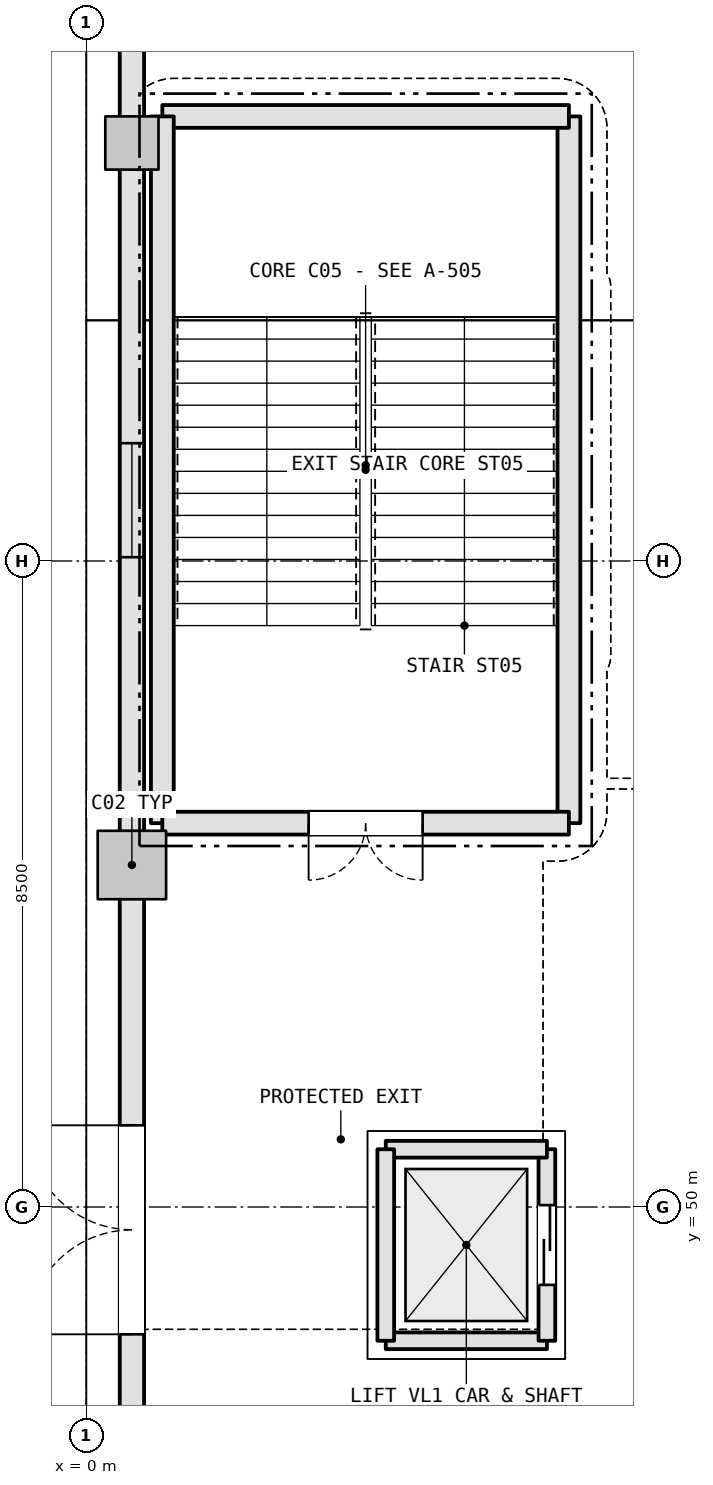
"""IFC4 building model, lengths in metres.
Left out: names, types, materials, properties, quantities, classifications, styles, units other than length and angle.
Written with IfcOpenShell. Run it as: python <this file> out.ifc"""

import sys

from ifc_helpers import new_model, si_unit, direction, frame, frame_2d, origin, origin_2d, place, context, subcontext, project, spatial, rectangle, extrude, element, fill, save


model = new_model("IFC4")
c1 = context("Model", 3, precision=1e-05, world=origin(), true_north=direction((0.0, 1.0)))
c2 = subcontext(c1, "Body", "Model", "MODEL_VIEW")
j1 = project(units=[si_unit("LENGTHUNIT", "METRE"), si_unit("PLANEANGLEUNIT", "RADIAN")], contexts=[c1])
p1 = place(None, origin())
s1 = spatial("IfcSite", under=j1, at=p1, CompositionType="ELEMENT")
p2 = place(p1, origin())
s2 = spatial("IfcBuilding", under=s1, at=p2, CompositionType="ELEMENT")
p3 = place(p2, origin())
s3 = spatial("IfcBuildingStorey", under=s2, at=p3, CompositionType="ELEMENT", Elevation=0.0)
p4 = place(p3, frame((0.6, 54.5, 0.0), z_axis=(0.0, 0.0, 1.0), x_axis=(1.0, 0.0, 0.0)))
e1 = element("IfcColumn", 1, at=p4, inside=s3, PredefinedType="COLUMN", context=c2, shape_type="SweptSolid", body=[
    extrude(rectangle(XDim=0.9, YDim=0.9, at=origin_2d()), origin(), (0.0, 0.0, 1.0), 5.4),
])
p5 = place(p3, frame((0.6, 64.0, 0.0), z_axis=(0.0, 0.0, 1.0), x_axis=(1.0, 0.0, 0.0)))
e2 = element("IfcColumn", 2, at=p5, inside=s3, PredefinedType="COLUMN", context=c2, shape_type="SweptSolid", body=[
    extrude(rectangle(XDim=0.7, YDim=0.7, at=origin_2d()), origin(), (0.0, 0.0, 1.0), 5.4),
])
p6 = place(p3, frame((0.6, 45.338, 0.0), z_axis=(0.0, 0.0, 1.0), x_axis=(0.0, 1.0, 0.0)))
e3 = element("IfcWall", 3, at=p6, inside=s3, PredefinedType="SOLIDWALL", context=c2, shape_type="SweptSolid", body=[
    extrude(rectangle(XDim=8.724, YDim=0.32, at=frame_2d((4.362, 0.0))), origin(), (0.0, 0.0, 1.0), 4.475),
])
p7 = place(p6, frame((2.987, 0.0, 0.0)))
e4 = element("IfcOpeningElement", 4, at=p7, cuts=e3, PredefinedType="OPENING", context=c2, shape_type="SweptSolid", body=[
    extrude(rectangle(XDim=2.75, YDim=2.4, at=frame_2d((1.375, 1.2))), frame((0.0, 0.17, 0.0), z_axis=(0.0, -1.0, 0.0), x_axis=(1.0, 0.0, 0.0)), (0.0, 0.0, 1.0), 0.34),
])
p8 = place(p3, frame((0.6, 54.938, 0.0), z_axis=(0.0, 0.0, 1.0), x_axis=(0.0, 1.0, 0.0)))
e5 = element("IfcWall", 5, at=p8, inside=s3, PredefinedType="SOLIDWALL", context=c2, shape_type="SweptSolid", body=[
    extrude(rectangle(XDim=8.724, YDim=0.32, at=frame_2d((4.362, 0.0))), origin(), (0.0, 0.0, 1.0), 4.475),
])
p9 = place(p8, frame((3.612, 0.0, 1.05)))
e6 = element("IfcOpeningElement", 6, at=p9, cuts=e5, PredefinedType="OPENING", context=c2, shape_type="SweptSolid", body=[
    extrude(rectangle(XDim=1.5, YDim=1.5, at=frame_2d((0.75, 0.75))), frame((0.0, 0.17, 0.0), z_axis=(0.0, -1.0, 0.0), x_axis=(1.0, 0.0, 0.0)), (0.0, 0.0, 1.0), 0.34),
])
p10 = place(p3, frame((0.6, 64.338, 0.0), z_axis=(0.0, 0.0, 1.0), x_axis=(0.0, 1.0, 0.0)))
e7 = element("IfcWall", 7, at=p10, inside=s3, PredefinedType="SOLIDWALL", context=c2, shape_type="SweptSolid", body=[
    extrude(rectangle(XDim=8.724, YDim=0.32, at=frame_2d((4.362, 0.0))), origin(), (0.0, 0.0, 1.0), 4.475),
])
p11 = place(p10, frame((3.612, 0.0, 1.05)))
e8 = element("IfcOpeningElement", 8, at=p11, cuts=e7, PredefinedType="OPENING", context=c2, shape_type="SweptSolid", body=[
    extrude(rectangle(XDim=1.5, YDim=1.5, at=frame_2d((0.75, 0.75))), frame((0.0, 0.17, 0.0), z_axis=(0.0, -1.0, 0.0), x_axis=(1.0, 0.0, 0.0)), (0.0, 0.0, 1.0), 0.34),
])
p12 = place(p3, frame((6.35, 55.05, 0.0), z_axis=(0.0, 0.0, 1.0), x_axis=(0.0, 1.0, 0.0)))
e9 = element("IfcWall", 9, at=p12, inside=s3, PredefinedType="SHEAR", context=c2, shape_type="SweptSolid", body=[
    extrude(rectangle(XDim=9.299, YDim=0.3, at=frame_2d((4.65, 0.0))), origin(), (0.0, 0.0, 1.0), 5.14),
])
p13 = place(p3, frame((6.35, 64.35, 0.0), z_axis=(0.0, 0.0, 1.0), x_axis=(-1.0, 0.0, 0.0)))
e10 = element("IfcWall", 10, at=p13, inside=s3, PredefinedType="SHEAR", context=c2, shape_type="SweptSolid", body=[
    extrude(rectangle(XDim=5.349, YDim=0.3, at=frame_2d((2.675, 0.0))), origin(), (0.0, 0.0, 1.0), 5.14),
])
p14 = place(p3, frame((1.0, 64.35, 0.0), z_axis=(0.0, 0.0, 1.0), x_axis=(0.0, -1.0, 0.0)))
e11 = element("IfcWall", 11, at=p14, inside=s3, PredefinedType="SHEAR", context=c2, shape_type="SweptSolid", body=[
    extrude(rectangle(XDim=9.299, YDim=0.3, at=frame_2d((4.65, 0.0))), origin(), (0.0, 0.0, 1.0), 5.14),
])
p15 = place(p3, frame((1.0, 55.05, 0.0), z_axis=(0.0, 0.0, 1.0), x_axis=(1.0, 0.0, 0.0)))
e12 = element("IfcWall", 12, at=p15, inside=s3, PredefinedType="SHEAR", context=c2, shape_type="SweptSolid", body=[
    extrude(rectangle(XDim=5.349, YDim=0.3, at=frame_2d((2.675, 0.0))), origin(), (0.0, 0.0, 1.0), 5.14),
])
p16 = place(p15, frame((1.925, 0.0, 0.0)))
e13 = element("IfcOpeningElement", 13, at=p16, cuts=e12, PredefinedType="OPENING", context=c2, shape_type="SweptSolid", body=[
    extrude(rectangle(XDim=1.5, YDim=2.2, at=frame_2d((0.75, 1.1))), frame((0.0, 0.16, 0.0), z_axis=(0.0, -1.0, 0.0), x_axis=(1.0, 0.0, 0.0)), (0.0, 0.0, 1.0), 0.32),
])
p17 = place(p3, frame((3.94, 48.24, -1.1), z_axis=(0.0, 0.0, 1.0), x_axis=(1.0, 0.0, 0.0)))
e14 = element("IfcWall", 14, at=p17, inside=s3, PredefinedType="SHEAR", context=c2, shape_type="SweptSolid", body=[
    extrude(rectangle(XDim=2.12, YDim=0.22, at=frame_2d((1.06, 0.0))), origin(), (0.0, 0.0, 1.0), 6.24),
])
p18 = place(p3, frame((6.06, 48.24, -1.1), z_axis=(0.0, 0.0, 1.0), x_axis=(0.0, 1.0, 0.0)))
e15 = element("IfcWall", 15, at=p18, inside=s3, PredefinedType="SHEAR", context=c2, shape_type="SweptSolid", body=[
    extrude(rectangle(XDim=2.52, YDim=0.22, at=frame_2d((1.26, 0.0))), origin(), (0.0, 0.0, 1.0), 6.24),
])
p19 = place(p18, frame((0.735, 0.0, 1.1)))
e16 = element("IfcOpeningElement", 16, at=p19, cuts=e15, PredefinedType="OPENING", context=c2, shape_type="SweptSolid", body=[
    extrude(rectangle(XDim=1.05, YDim=2.15, at=frame_2d((0.525, 1.075))), frame((0.0, 0.12, 0.0), z_axis=(0.0, -1.0, 0.0), x_axis=(1.0, 0.0, 0.0)), (0.0, 0.0, 1.0), 0.24),
])
p20 = place(p3, frame((6.06, 50.76, -1.1), z_axis=(0.0, 0.0, 1.0), x_axis=(-1.0, 0.0, 0.0)))
e17 = element("IfcWall", 17, at=p20, inside=s3, PredefinedType="SHEAR", context=c2, shape_type="SweptSolid", body=[
    extrude(rectangle(XDim=2.12, YDim=0.22, at=frame_2d((1.06, 0.0))), origin(), (0.0, 0.0, 1.0), 6.24),
])
p21 = place(p3, frame((3.94, 50.76, -1.1), z_axis=(0.0, 0.0, 1.0), x_axis=(0.0, -1.0, 0.0)))
e18 = element("IfcWall", 18, at=p21, inside=s3, PredefinedType="SHEAR", context=c2, shape_type="SweptSolid", body=[
    extrude(rectangle(XDim=2.52, YDim=0.22, at=frame_2d((1.26, 0.0))), origin(), (0.0, 0.0, 1.0), 6.24),
])
p22 = place(p7, origin())
e19 = element("IfcDoor", 19, at=p22, inside=s3, OperationType="DOUBLE_DOOR_SINGLE_SWING", PredefinedType="DOOR", context=c2, shape_type="SweptSolid", body=[
    extrude(rectangle(XDim=2.75, YDim=2.4, at=frame_2d((1.375, 1.2))), frame((0.0, 0.025, 0.0), z_axis=(0.0, -1.0, 0.0), x_axis=(1.0, 0.0, 0.0)), (0.0, 0.0, 1.0), 0.05),
])
fill(e4, e19)
p23 = place(p9, origin())
e20 = element("IfcWindow", 20, at=p23, inside=s3, PartitioningType="SINGLE_PANEL", PredefinedType="WINDOW", context=c2, shape_type="SweptSolid", body=[
    extrude(rectangle(XDim=1.5, YDim=1.5, at=frame_2d((0.75, 0.75))), frame((0.0, 0.03, 0.0), z_axis=(0.0, -1.0, 0.0), x_axis=(1.0, 0.0, 0.0)), (0.0, 0.0, 1.0), 0.06),
])
fill(e6, e20)
p24 = place(p16, frame((1.5, 0.0, 0.0), z_axis=(0.0, 0.0, 1.0), x_axis=(-1.0, 0.0, 0.0)))
e21 = element("IfcDoor", 21, at=p24, inside=s3, OperationType="DOUBLE_DOOR_SINGLE_SWING", PredefinedType="DOOR", context=c2, shape_type="SweptSolid", body=[
    extrude(rectangle(XDim=1.5, YDim=2.2, at=frame_2d((0.75, 1.1))), frame((0.0, 0.025, 0.0), z_axis=(0.0, -1.0, 0.0), x_axis=(1.0, 0.0, 0.0)), (0.0, 0.0, 1.0), 0.05),
])
fill(e13, e21)
p25 = place(p19, origin())
e22 = element("IfcDoor", 22, at=p25, inside=s3, OperationType="DOUBLE_DOOR_SLIDING", PredefinedType="DOOR", context=c2, shape_type="SweptSolid", body=[
    extrude(rectangle(XDim=1.05, YDim=2.15, at=frame_2d((0.525, 1.075))), frame((0.0, 0.025, 0.0), z_axis=(0.0, -1.0, 0.0), x_axis=(1.0, 0.0, 0.0)), (0.0, 0.0, 1.0), 0.05),
])
fill(e16, e22)
save(model, sys.argv[1])
